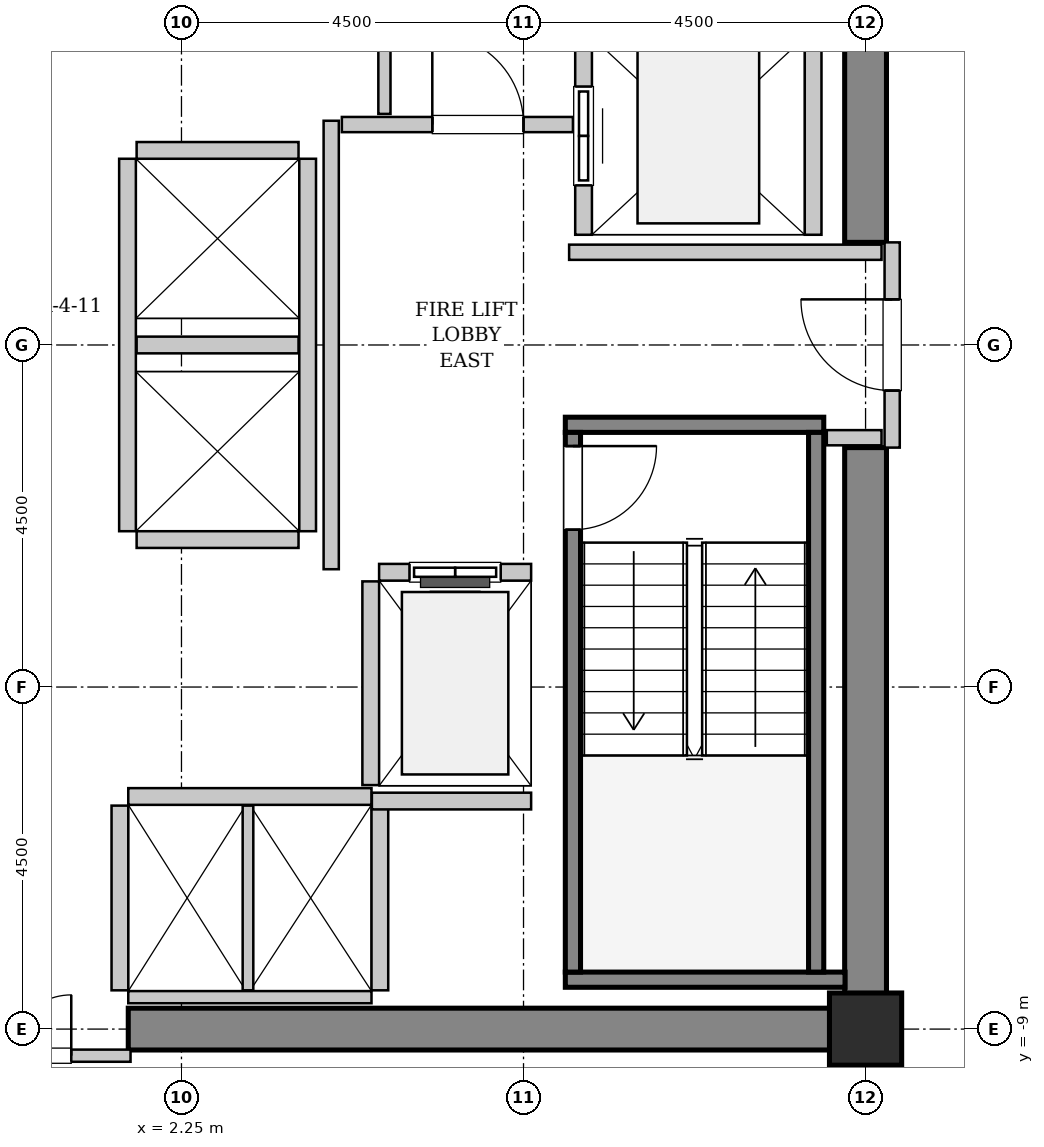
"""IFC4 building model, lengths in metres.
Left out: names, types, materials, properties, quantities, classifications, styles, units other than length and angle.
Written with IfcOpenShell. Run it as: python <this file> out.ifc"""

import sys

from ifc_helpers import new_model, si_unit, direction, frame, frame_2d, origin, origin_2d, place, context, subcontext, project, spatial, rectangle, hollow_rectangle, extrude, source, transform, mapped, element, fill, save


model = new_model("IFC4")
c1 = context("Model", 3, precision=1e-05, world=origin(), true_north=direction((0.0, 1.0)))
c2 = subcontext(c1, "Body", "Model", "MODEL_VIEW")
j1 = project(units=[si_unit("LENGTHUNIT", "METRE"), si_unit("PLANEANGLEUNIT", "RADIAN")], contexts=[c1])
p1 = place(None, origin())
s1 = spatial("IfcSite", under=j1, at=p1, CompositionType="ELEMENT")
p2 = place(p1, origin())
s2 = spatial("IfcBuilding", under=s1, at=p2, CompositionType="ELEMENT")
p3 = place(p2, frame((0.0, 0.0, 102.2)))
s3 = spatial("IfcBuildingStorey", under=s2, at=p3, CompositionType="ELEMENT", Elevation=102.2)
m1 = source(origin(), c2, "Body", "SweptSolid", [
    extrude(rectangle(XDim=9.975, YDim=0.55, at=frame_2d((4.987, 0.0))), origin(), (0.0, 0.0, 1.0), 3.8),
])
p4 = place(p3, frame((1.55, -9.0, 0.0), z_axis=(0.0, 0.0, 1.0), x_axis=(1.0, 0.0, 0.0)))
e1 = element("IfcWall", 1, at=p4, inside=s3, PredefinedType="SHEAR", context=c2, shape_type="MappedRepresentation", body=[
    mapped(m1, transform((0.0, 0.0, 0.0), x_axis=(1.0, 0.0, 0.0), y_axis=(0.0, 1.0, 0.0), z_axis=(0.0, 0.0, 1.0), scale=1.0)),
])
m2 = source(origin(), c2, "Body", "SweptSolid", [
    extrude(rectangle(XDim=7.375, YDim=0.55, at=frame_2d((3.688, 0.0))), origin(), (0.0, 0.0, 1.0), 3.8),
])
for number, where, z_axis, x_axis in (
    (2, (11.25, -8.725, 0.0), (0.0, 0.0, 1.0), (0.0, 1.0, 0.0)),
    (3, (11.25, 1.35, 0.0), (0.0, 0.0, 1.0), (0.0, 1.0, 0.0)),
):
    element("IfcWall", number, at=place(p3, frame(where, z_axis=z_axis, x_axis=x_axis)), inside=s3, PredefinedType="SHEAR", context=c2, shape_type="MappedRepresentation", body=[
        mapped(m2, transform((0.0, 0.0, 0.0), x_axis=(1.0, 0.0, 0.0), y_axis=(0.0, 1.0, 0.0), z_axis=(0.0, 0.0, 1.0), scale=1.0)),
    ])
m3 = source(origin(), c2, "Body", "SweptSolid", [
    extrude(hollow_rectangle(XDim=0.95, YDim=0.95, WallThickness=0.045, InnerFilletRadius=0.045, OuterFilletRadius=0.09, at=origin_2d()), origin(), (0.0, 0.0, 1.0), 3.8),
])
p5 = place(p3, frame((11.25, -9.0, 0.0), z_axis=(0.0, 0.0, 1.0), x_axis=(1.0, 0.0, 0.0)))
e4 = element("IfcColumn", 4, at=p5, inside=s3, PredefinedType="COLUMN", context=c2, shape_type="MappedRepresentation", body=[
    mapped(m3, transform((0.0, 0.0, 0.0), x_axis=(1.0, 0.0, 0.0), y_axis=(0.0, 1.0, 0.0), z_axis=(0.0, 0.0, 1.0), scale=1.0)),
])
m4 = source(origin(), c2, "Body", "SweptSolid", [
    extrude(rectangle(XDim=3.4, YDim=0.2, at=frame_2d((1.7, 0.0))), origin(), (0.0, 0.0, 1.0), 3.8),
])
p6 = place(p3, frame((7.3, -1.05, 0.0), z_axis=(0.0, 0.0, 1.0), x_axis=(1.0, 0.0, 0.0)))
e5 = element("IfcWall", 5, at=p6, inside=s3, PredefinedType="SOLIDWALL", context=c2, shape_type="MappedRepresentation", body=[
    mapped(m4, transform((0.0, 0.0, 0.0), x_axis=(1.0, 0.0, 0.0), y_axis=(0.0, 1.0, 0.0), z_axis=(0.0, 0.0, 1.0), scale=1.0)),
])
m5 = source(origin(), c2, "Body", "SweptSolid", [
    extrude(rectangle(XDim=3.68, YDim=0.2, at=frame_2d((1.84, 0.0))), origin(), (0.0, 0.0, 1.0), 3.8),
])
p7 = place(p3, frame((7.3, -8.35, 0.0), z_axis=(0.0, 0.0, 1.0), x_axis=(1.0, 0.0, 0.0)))
e6 = element("IfcWall", 6, at=p7, inside=s3, PredefinedType="SOLIDWALL", context=c2, shape_type="MappedRepresentation", body=[
    mapped(m5, transform((0.0, 0.0, 0.0), x_axis=(1.0, 0.0, 0.0), y_axis=(0.0, 1.0, 0.0), z_axis=(0.0, 0.0, 1.0), scale=1.0)),
])
m6 = source(origin(), c2, "Body", "SweptSolid", [
    extrude(rectangle(XDim=7.1, YDim=0.2, at=frame_2d((3.55, 0.0))), origin(), (0.0, 0.0, 1.0), 3.8),
])
p8 = place(p3, frame((7.4, -1.15, 0.0), z_axis=(0.0, 0.0, 1.0), x_axis=(0.0, -1.0, 0.0)))
e7 = element("IfcWall", 7, at=p8, inside=s3, PredefinedType="SOLIDWALL", context=c2, shape_type="MappedRepresentation", body=[
    mapped(m6, transform((0.0, 0.0, 0.0), x_axis=(1.0, 0.0, 0.0), y_axis=(0.0, 1.0, 0.0), z_axis=(0.0, 0.0, 1.0), scale=1.0)),
])
p9 = place(p8, frame((0.18, 0.0, 0.0)))
e8 = element("IfcOpeningElement", 8, at=p9, cuts=e7, PredefinedType="OPENING", context=c2, shape_type="SweptSolid", body=[
    extrude(rectangle(XDim=1.1, YDim=2.15, at=frame_2d((0.55, 1.075))), frame((0.0, 0.11, 0.0), z_axis=(0.0, -1.0, 0.0), x_axis=(1.0, 0.0, 0.0)), (0.0, 0.0, 1.0), 0.22),
])
p10 = place(p3, frame((10.6, -1.15, 0.0), z_axis=(0.0, 0.0, 1.0), x_axis=(0.0, -1.0, 0.0)))
e9 = element("IfcWall", 9, at=p10, inside=s3, PredefinedType="SOLIDWALL", context=c2, shape_type="MappedRepresentation", body=[
    mapped(m6, transform((0.0, 0.0, 0.0), x_axis=(1.0, 0.0, 0.0), y_axis=(0.0, 1.0, 0.0), z_axis=(0.0, 0.0, 1.0), scale=1.0)),
])
m7 = source(origin(), c2, "Body", "SweptSolid", [
    extrude(rectangle(XDim=2.0, YDim=0.22, at=frame_2d((1.0, 0.0))), origin(), (0.0, 0.0, 1.0), 3.535),
])
p11 = place(p3, frame((6.85, -2.99, 0.0), z_axis=(0.0, 0.0, 1.0), x_axis=(-1.0, 0.0, 0.0)))
e10 = element("IfcWall", 10, at=p11, inside=s3, PredefinedType="SOLIDWALL", context=c2, shape_type="MappedRepresentation", body=[
    mapped(m7, transform((0.0, 0.0, 0.0), x_axis=(1.0, 0.0, 0.0), y_axis=(0.0, 1.0, 0.0), z_axis=(0.0, 0.0, 1.0), scale=1.0)),
])
p12 = place(p11, frame((0.4, 0.0, 0.0)))
e11 = element("IfcOpeningElement", 11, at=p12, cuts=e10, PredefinedType="OPENING", context=c2, shape_type="SweptSolid", body=[
    extrude(rectangle(XDim=1.2, YDim=2.2, at=frame_2d((0.6, 1.1))), frame((0.0, 0.12, 0.0), z_axis=(0.0, -1.0, 0.0), x_axis=(1.0, 0.0, 0.0)), (0.0, 0.0, 1.0), 0.24),
])
m8 = source(origin(), c2, "Body", "SweptSolid", [
    extrude(rectangle(XDim=2.68, YDim=0.22, at=frame_2d((1.34, 0.0))), origin(), (0.0, 0.0, 1.0), 3.535),
])
p13 = place(p3, frame((4.74, -3.11, 0.0), z_axis=(0.0, 0.0, 1.0), x_axis=(0.0, -1.0, 0.0)))
e12 = element("IfcWall", 12, at=p13, inside=s3, PredefinedType="SOLIDWALL", context=c2, shape_type="MappedRepresentation", body=[
    mapped(m8, transform((0.0, 0.0, 0.0), x_axis=(1.0, 0.0, 0.0), y_axis=(0.0, 1.0, 0.0), z_axis=(0.0, 0.0, 1.0), scale=1.0)),
])
m9 = source(origin(), c2, "Body", "SweptSolid", [
    extrude(rectangle(XDim=5.45, YDim=0.22, at=frame_2d((2.725, 0.0))), origin(), (0.0, 0.0, 1.0), 3.535),
])
p14 = place(p3, frame((7.54, 6.9, 0.0), z_axis=(0.0, 0.0, 1.0), x_axis=(0.0, -1.0, 0.0)))
e13 = element("IfcWall", 13, at=p14, inside=s3, PredefinedType="SOLIDWALL", context=c2, shape_type="MappedRepresentation", body=[
    mapped(m9, transform((0.0, 0.0, 0.0), x_axis=(1.0, 0.0, 0.0), y_axis=(0.0, 1.0, 0.0), z_axis=(0.0, 0.0, 1.0), scale=1.0)),
])
p15 = place(p14, frame((3.5, 0.0, 0.0)))
e14 = element("IfcOpeningElement", 14, at=p15, cuts=e13, PredefinedType="OPENING", context=c2, shape_type="SweptSolid", body=[
    extrude(rectangle(XDim=1.3, YDim=2.3, at=frame_2d((0.65, 1.15))), frame((0.0, 0.12, 0.0), z_axis=(0.0, -1.0, 0.0), x_axis=(1.0, 0.0, 0.0)), (0.0, 0.0, 1.0), 0.24),
])
p16 = place(p14, frame((0.65, 0.0, 0.0)))
e15 = element("IfcOpeningElement", 15, at=p16, cuts=e13, PredefinedType="OPENING", context=c2, shape_type="SweptSolid", body=[
    extrude(rectangle(XDim=1.3, YDim=2.3, at=frame_2d((0.65, 1.15))), frame((0.0, 0.12, 0.0), z_axis=(0.0, -1.0, 0.0), x_axis=(1.0, 0.0, 0.0)), (0.0, 0.0, 1.0), 0.24),
])
p17 = place(p3, frame((10.56, 1.45, 0.0), z_axis=(0.0, 0.0, 1.0), x_axis=(0.0, 1.0, 0.0)))
e16 = element("IfcWall", 16, at=p17, inside=s3, PredefinedType="SOLIDWALL", context=c2, shape_type="MappedRepresentation", body=[
    mapped(m9, transform((0.0, 0.0, 0.0), x_axis=(1.0, 0.0, 0.0), y_axis=(0.0, 1.0, 0.0), z_axis=(0.0, 0.0, 1.0), scale=1.0)),
])
m10 = source(origin(), c2, "Body", "SweptSolid", [
    extrude(rectangle(XDim=3.2, YDim=0.22, at=frame_2d((1.6, 0.0))), origin(), (0.0, 0.0, 1.0), 3.535),
])
p18 = place(p3, frame((4.75, -5.94, 0.0), z_axis=(0.0, 0.0, 1.0), x_axis=(-1.0, 0.0, 0.0)))
e17 = element("IfcWall", 17, at=p18, inside=s3, PredefinedType="SOLIDWALL", context=c2, shape_type="MappedRepresentation", body=[
    mapped(m10, transform((0.0, 0.0, 0.0), x_axis=(1.0, 0.0, 0.0), y_axis=(0.0, 1.0, 0.0), z_axis=(0.0, 0.0, 1.0), scale=1.0)),
])
m11 = source(origin(), c2, "Body", "SweptSolid", [
    extrude(rectangle(XDim=3.2, YDim=0.16, at=frame_2d((1.6, 0.0))), origin(), (0.0, 0.0, 1.0), 2.425),
])
p19 = place(p3, frame((1.55, -8.58, 0.0), z_axis=(0.0, 0.0, 1.0), x_axis=(1.0, 0.0, 0.0)))
e18 = element("IfcWall", 18, at=p19, inside=s3, PredefinedType="PARTITIONING", context=c2, shape_type="MappedRepresentation", body=[
    mapped(m11, transform((0.0, 0.0, 0.0), x_axis=(1.0, 0.0, 0.0), y_axis=(0.0, 1.0, 0.0), z_axis=(0.0, 0.0, 1.0), scale=1.0)),
])
m12 = source(origin(), c2, "Body", "SweptSolid", [
    extrude(rectangle(XDim=2.43, YDim=0.22, at=frame_2d((1.215, 0.0))), origin(), (0.0, 0.0, 1.0), 3.535),
])
p20 = place(p3, frame((1.44, -6.06, 0.0), z_axis=(0.0, 0.0, 1.0), x_axis=(0.0, -1.0, 0.0)))
e19 = element("IfcWall", 19, at=p20, inside=s3, PredefinedType="SOLIDWALL", context=c2, shape_type="MappedRepresentation", body=[
    mapped(m12, transform((0.0, 0.0, 0.0), x_axis=(1.0, 0.0, 0.0), y_axis=(0.0, 1.0, 0.0), z_axis=(0.0, 0.0, 1.0), scale=1.0)),
])
m13 = source(origin(), c2, "Body", "SweptSolid", [
    extrude(rectangle(XDim=2.43, YDim=0.14, at=frame_2d((1.215, 0.0))), origin(), (0.0, 0.0, 1.0), 3.535),
])
p21 = place(p3, frame((3.125, -8.49, 0.0), z_axis=(0.0, 0.0, 1.0), x_axis=(0.0, 1.0, 0.0)))
e20 = element("IfcWall", 20, at=p21, inside=s3, PredefinedType="PARTITIONING", context=c2, shape_type="MappedRepresentation", body=[
    mapped(m13, transform((0.0, 0.0, 0.0), x_axis=(1.0, 0.0, 0.0), y_axis=(0.0, 1.0, 0.0), z_axis=(0.0, 0.0, 1.0), scale=1.0)),
])
p22 = place(p3, frame((4.86, -8.49, 0.0), z_axis=(0.0, 0.0, 1.0), x_axis=(0.0, 1.0, 0.0)))
e21 = element("IfcWall", 21, at=p22, inside=s3, PredefinedType="SOLIDWALL", context=c2, shape_type="MappedRepresentation", body=[
    mapped(m12, transform((0.0, 0.0, 0.0), x_axis=(1.0, 0.0, 0.0), y_axis=(0.0, 1.0, 0.0), z_axis=(0.0, 0.0, 1.0), scale=1.0)),
])
m14 = source(origin(), c2, "Body", "SweptSolid", [
    extrude(rectangle(XDim=4.9, YDim=0.22, at=frame_2d((2.45, 0.0))), origin(), (0.0, 0.0, 1.0), 3.535),
])
for number, where, z_axis, x_axis in (
    (22, (1.54, 2.45, 0.0), (0.0, 0.0, 1.0), (0.0, -1.0, 0.0)),
    (23, (3.91, -2.45, 0.0), (0.0, 0.0, 1.0), (0.0, 1.0, 0.0)),
):
    element("IfcWall", number, at=place(p3, frame(where, z_axis=z_axis, x_axis=x_axis)), inside=s3, PredefinedType="SOLIDWALL", context=c2, shape_type="MappedRepresentation", body=[
        mapped(m14, transform((0.0, 0.0, 0.0), x_axis=(1.0, 0.0, 0.0), y_axis=(0.0, 1.0, 0.0), z_axis=(0.0, 0.0, 1.0), scale=1.0)),
    ])
m15 = source(origin(), c2, "Body", "SweptSolid", [
    extrude(rectangle(XDim=2.13, YDim=0.22, at=frame_2d((1.065, 0.0))), origin(), (0.0, 0.0, 1.0), 3.535),
])
for number, where, z_axis, x_axis in (
    (24, (1.66, -2.56, 0.0), (0.0, 0.0, 1.0), (1.0, 0.0, 0.0)),
    (25, (1.66, 0.0, 0.0), (0.0, 0.0, 1.0), (1.0, 0.0, 0.0)),
    (26, (3.79, 2.56, 0.0), (0.0, 0.0, 1.0), (-1.0, 0.0, 0.0)),
):
    element("IfcWall", number, at=place(p3, frame(where, z_axis=z_axis, x_axis=x_axis)), inside=s3, PredefinedType="SOLIDWALL", context=c2, shape_type="MappedRepresentation", body=[
        mapped(m15, transform((0.0, 0.0, 0.0), x_axis=(1.0, 0.0, 0.0), y_axis=(0.0, 1.0, 0.0), z_axis=(0.0, 0.0, 1.0), scale=1.0)),
    ])
m16 = source(origin(), c2, "Body", "SweptSolid", [
    extrude(rectangle(XDim=2.095, YDim=0.22, at=frame_2d((1.048, 0.0))), origin(), (0.0, 0.0, 1.0), 3.535),
])
p23 = place(p3, frame((4.755, -6.0, 0.0), z_axis=(0.0, 0.0, 1.0), x_axis=(1.0, 0.0, 0.0)))
e27 = element("IfcWall", 27, at=p23, inside=s3, PredefinedType="SOLIDWALL", context=c2, shape_type="MappedRepresentation", body=[
    mapped(m16, transform((0.0, 0.0, 0.0), x_axis=(1.0, 0.0, 0.0), y_axis=(0.0, 1.0, 0.0), z_axis=(0.0, 0.0, 1.0), scale=1.0)),
])
m17 = source(origin(), c2, "Body", "SweptSolid", [
    extrude(rectangle(XDim=2.7, YDim=0.2, at=frame_2d((1.35, 0.0))), origin(), (0.0, 0.0, 1.0), 2.425),
])
p24 = place(p3, frame((11.6, -1.35, 0.0), z_axis=(0.0, 0.0, 1.0), x_axis=(0.0, 1.0, 0.0)))
e28 = element("IfcWall", 28, at=p24, inside=s3, PredefinedType="PARTITIONING", context=c2, shape_type="MappedRepresentation", body=[
    mapped(m17, transform((0.0, 0.0, 0.0), x_axis=(1.0, 0.0, 0.0), y_axis=(0.0, 1.0, 0.0), z_axis=(0.0, 0.0, 1.0), scale=1.0)),
])
p25 = place(p24, frame((0.75, 0.0, 0.0)))
e29 = element("IfcOpeningElement", 29, at=p25, cuts=e28, PredefinedType="OPENING", context=c2, shape_type="SweptSolid", body=[
    extrude(rectangle(XDim=1.2, YDim=2.15, at=frame_2d((0.6, 1.075))), frame((0.0, 0.11, 0.0), z_axis=(0.0, -1.0, 0.0), x_axis=(1.0, 0.0, 0.0)), (0.0, 0.0, 1.0), 0.22),
])
m18 = source(origin(), c2, "Body", "SweptSolid", [
    extrude(rectangle(XDim=5.9, YDim=0.2, at=frame_2d((2.95, 0.0))), origin(), (0.0, 0.0, 1.0), 3.535),
])
p26 = place(p3, frame((4.22, -2.95, 0.0), z_axis=(0.0, 0.0, 1.0), x_axis=(0.0, 1.0, 0.0)))
e30 = element("IfcWall", 30, at=p26, inside=s3, PredefinedType="PARTITIONING", context=c2, shape_type="MappedRepresentation", body=[
    mapped(m18, transform((0.0, 0.0, 0.0), x_axis=(1.0, 0.0, 0.0), y_axis=(0.0, 1.0, 0.0), z_axis=(0.0, 0.0, 1.0), scale=1.0)),
])
m19 = source(origin(), c2, "Body", "SweptSolid", [
    extrude(rectangle(XDim=3.04, YDim=0.2, at=frame_2d((1.52, 0.0))), origin(), (0.0, 0.0, 1.0), 3.535),
])
p27 = place(p3, frame((4.36, 2.9, 0.0), z_axis=(0.0, 0.0, 1.0), x_axis=(1.0, 0.0, 0.0)))
e31 = element("IfcWall", 31, at=p27, inside=s3, PredefinedType="PARTITIONING", context=c2, shape_type="MappedRepresentation", body=[
    mapped(m19, transform((0.0, 0.0, 0.0), x_axis=(1.0, 0.0, 0.0), y_axis=(0.0, 1.0, 0.0), z_axis=(0.0, 0.0, 1.0), scale=1.0)),
])
p28 = place(p27, frame((1.19, 0.0, 0.0)))
e32 = element("IfcOpeningElement", 32, at=p28, cuts=e31, PredefinedType="OPENING", context=c2, shape_type="SweptSolid", body=[
    extrude(rectangle(XDim=1.2, YDim=2.15, at=frame_2d((0.6, 1.075))), frame((0.0, 0.11, 0.0), z_axis=(0.0, -1.0, 0.0), x_axis=(1.0, 0.0, 0.0)), (0.0, 0.0, 1.0), 0.22),
])
m20 = source(origin(), c2, "Body", "SweptSolid", [
    extrude(rectangle(XDim=4.11, YDim=0.2, at=frame_2d((2.055, 0.0))), origin(), (0.0, 0.0, 1.0), 3.535),
])
p29 = place(p3, frame((7.35, 1.22, 0.0), z_axis=(0.0, 0.0, 1.0), x_axis=(1.0, 0.0, 0.0)))
e33 = element("IfcWall", 33, at=p29, inside=s3, PredefinedType="PARTITIONING", context=c2, shape_type="MappedRepresentation", body=[
    mapped(m20, transform((0.0, 0.0, 0.0), x_axis=(1.0, 0.0, 0.0), y_axis=(0.0, 1.0, 0.0), z_axis=(0.0, 0.0, 1.0), scale=1.0)),
])
m21 = source(origin(), c2, "Body", "SweptSolid", [
    extrude(rectangle(XDim=0.72, YDim=0.2, at=frame_2d((0.36, 0.0))), origin(), (0.0, 0.0, 1.0), 3.535),
])
p30 = place(p3, frame((10.74, -1.22, 0.0), z_axis=(0.0, 0.0, 1.0), x_axis=(1.0, 0.0, 0.0)))
e34 = element("IfcWall", 34, at=p30, inside=s3, PredefinedType="PARTITIONING", context=c2, shape_type="MappedRepresentation", body=[
    mapped(m21, transform((0.0, 0.0, 0.0), x_axis=(1.0, 0.0, 0.0), y_axis=(0.0, 1.0, 0.0), z_axis=(0.0, 0.0, 1.0), scale=1.0)),
])
m22 = source(origin(), c2, "Body", "SweptSolid", [
    extrude(rectangle(XDim=3.16, YDim=0.16, at=frame_2d((1.58, 0.0))), origin(), (0.0, 0.0, 1.0), 2.425),
])
p31 = place(p3, frame((-1.58, -9.35, 0.0), z_axis=(0.0, 0.0, 1.0), x_axis=(1.0, 0.0, 0.0)))
e35 = element("IfcWall", 35, at=p31, inside=s3, PredefinedType="PARTITIONING", context=c2, shape_type="MappedRepresentation", body=[
    mapped(m22, transform((0.0, 0.0, 0.0), x_axis=(1.0, 0.0, 0.0), y_axis=(0.0, 1.0, 0.0), z_axis=(0.0, 0.0, 1.0), scale=1.0)),
])
p32 = place(p31, frame((0.78, 0.0, 0.0)))
e36 = element("IfcOpeningElement", 36, at=p32, cuts=e35, PredefinedType="OPENING", context=c2, shape_type="SweptSolid", body=[
    extrude(rectangle(XDim=1.6, YDim=2.3, at=frame_2d((0.8, 1.15))), frame((0.0, 0.09, 0.0), z_axis=(0.0, -1.0, 0.0), x_axis=(1.0, 0.0, 0.0)), (0.0, 0.0, 1.0), 0.18),
])
m23 = source(origin(), c2, "Body", "SweptSolid", [
    extrude(rectangle(XDim=3.015, YDim=0.16, at=frame_2d((1.507, 0.0))), origin(), (0.0, 0.0, 1.0), 3.535),
])
p33 = place(p3, frame((4.92, 3.04, 0.0), z_axis=(0.0, 0.0, 1.0), x_axis=(0.0, 1.0, 0.0)))
e37 = element("IfcWall", 37, at=p33, inside=s3, PredefinedType="PARTITIONING", context=c2, shape_type="MappedRepresentation", body=[
    mapped(m23, transform((0.0, 0.0, 0.0), x_axis=(1.0, 0.0, 0.0), y_axis=(0.0, 1.0, 0.0), z_axis=(0.0, 0.0, 1.0), scale=1.0)),
])
m24 = source(origin(), c2, "Body", "SweptSolid", [
    extrude(rectangle(XDim=1.1, YDim=2.15, at=frame_2d((0.55, 1.075))), frame((0.0, 0.025, 0.0), z_axis=(0.0, -1.0, 0.0), x_axis=(1.0, 0.0, 0.0)), (0.0, 0.0, 1.0), 0.05),
])
p34 = place(p9, origin())
e38 = element("IfcDoor", 38, at=p34, inside=s3, OperationType="SINGLE_SWING_LEFT", PredefinedType="DOOR", context=c2, shape_type="MappedRepresentation", body=[
    mapped(m24, transform((0.0, 0.0, 0.0), x_axis=(1.0, 0.0, 0.0), y_axis=(0.0, 1.0, 0.0), z_axis=(0.0, 0.0, 1.0), scale=1.0)),
])
fill(e8, e38)
m25 = source(origin(), c2, "Body", "SweptSolid", [
    extrude(rectangle(XDim=1.2, YDim=2.2, at=frame_2d((0.6, 1.1))), frame((0.0, 0.025, 0.0), z_axis=(0.0, -1.0, 0.0), x_axis=(1.0, 0.0, 0.0)), (0.0, 0.0, 1.0), 0.05),
])
p35 = place(p12, origin())
e39 = element("IfcDoor", 39, at=p35, inside=s3, OperationType="SLIDING_TO_LEFT", PredefinedType="DOOR", context=c2, shape_type="MappedRepresentation", body=[
    mapped(m25, transform((0.0, 0.0, 0.0), x_axis=(1.0, 0.0, 0.0), y_axis=(0.0, 1.0, 0.0), z_axis=(0.0, 0.0, 1.0), scale=1.0)),
])
fill(e11, e39)
m26 = source(origin(), c2, "Body", "SweptSolid", [
    extrude(rectangle(XDim=1.3, YDim=2.3, at=frame_2d((0.65, 1.15))), frame((0.0, 0.025, 0.0), z_axis=(0.0, -1.0, 0.0), x_axis=(1.0, 0.0, 0.0)), (0.0, 0.0, 1.0), 0.05),
])
p36 = place(p15, origin())
e40 = element("IfcDoor", 40, at=p36, inside=s3, OperationType="SLIDING_TO_RIGHT", PredefinedType="DOOR", context=c2, shape_type="MappedRepresentation", body=[
    mapped(m26, transform((0.0, 0.0, 0.0), x_axis=(1.0, 0.0, 0.0), y_axis=(0.0, 1.0, 0.0), z_axis=(0.0, 0.0, 1.0), scale=1.0)),
])
fill(e14, e40)
m27 = source(origin(), c2, "Body", "SweptSolid", [
    extrude(rectangle(XDim=1.2, YDim=2.15, at=frame_2d((0.6, 1.075))), frame((0.0, 0.025, 0.0), z_axis=(0.0, -1.0, 0.0), x_axis=(1.0, 0.0, 0.0)), (0.0, 0.0, 1.0), 0.05),
])
p37 = place(p25, origin())
e41 = element("IfcDoor", 41, at=p37, inside=s3, OperationType="SINGLE_SWING_RIGHT", PredefinedType="DOOR", context=c2, shape_type="MappedRepresentation", body=[
    mapped(m27, transform((0.0, 0.0, 0.0), x_axis=(1.0, 0.0, 0.0), y_axis=(0.0, 1.0, 0.0), z_axis=(0.0, 0.0, 1.0), scale=1.0)),
])
fill(e29, e41)
p38 = place(p28, origin())
e42 = element("IfcDoor", 42, at=p38, inside=s3, OperationType="SINGLE_SWING_LEFT", PredefinedType="DOOR", context=c2, shape_type="MappedRepresentation", body=[
    mapped(m27, transform((0.0, 0.0, 0.0), x_axis=(1.0, 0.0, 0.0), y_axis=(0.0, 1.0, 0.0), z_axis=(0.0, 0.0, 1.0), scale=1.0)),
])
fill(e32, e42)
m28 = source(origin(), c2, "Body", "SweptSolid", [
    extrude(rectangle(XDim=1.6, YDim=2.3, at=frame_2d((0.8, 1.15))), frame((0.0, 0.025, 0.0), z_axis=(0.0, -1.0, 0.0), x_axis=(1.0, 0.0, 0.0)), (0.0, 0.0, 1.0), 0.05),
])
p39 = place(p32, origin())
e43 = element("IfcDoor", 43, at=p39, inside=s3, OperationType="DOUBLE_DOOR_SINGLE_SWING", PredefinedType="DOOR", context=c2, shape_type="MappedRepresentation", body=[
    mapped(m28, transform((0.0, 0.0, 0.0), x_axis=(1.0, 0.0, 0.0), y_axis=(0.0, 1.0, 0.0), z_axis=(0.0, 0.0, 1.0), scale=1.0)),
])
fill(e36, e43)
save(model, sys.argv[1])
